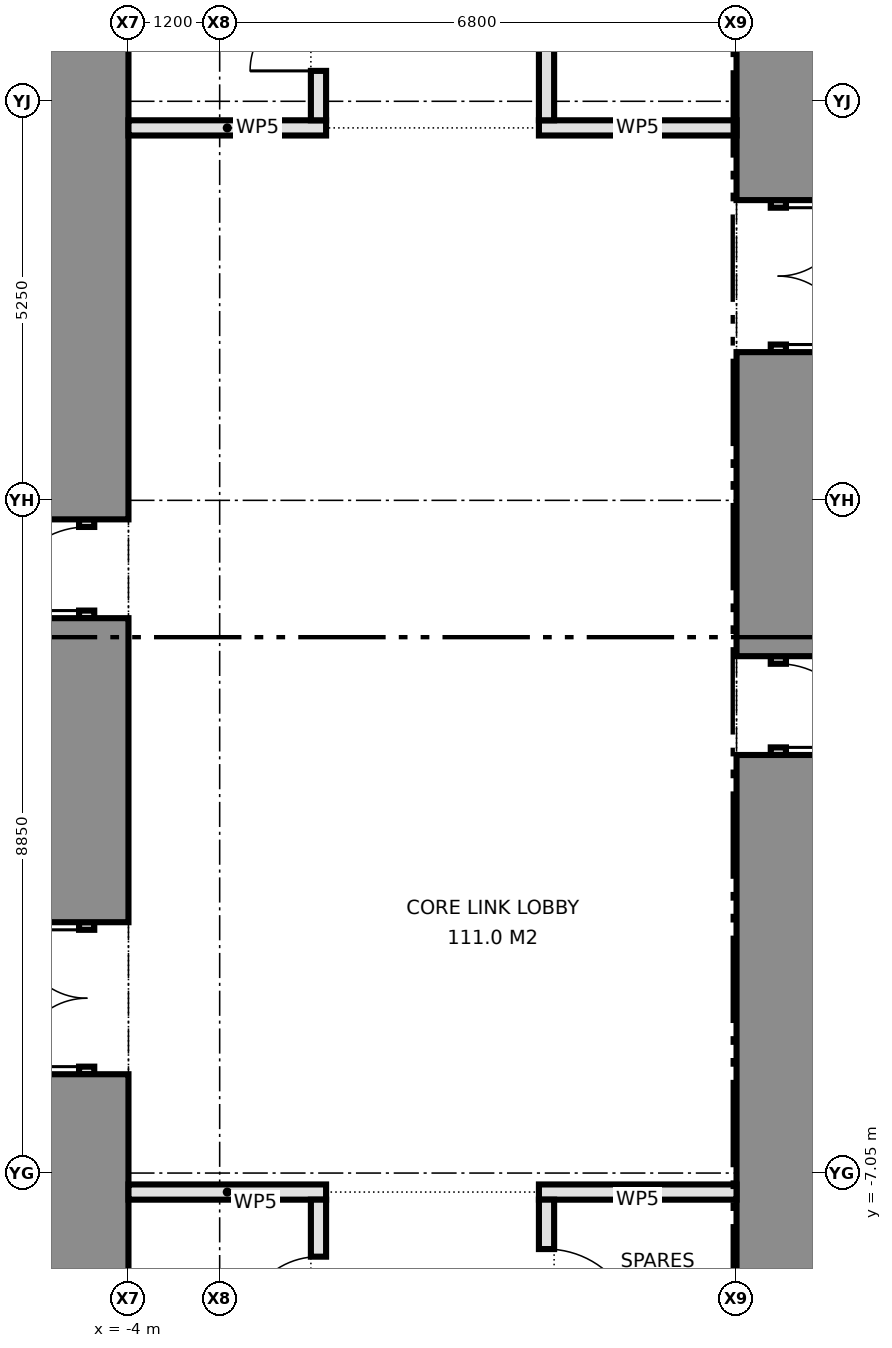
"""IFC4 building model, lengths in metres.
Left out: names, types, materials, properties, quantities, classifications, styles, units other than length and angle.
Written with IfcOpenShell. Run it as: python <this file> out.ifc"""

import sys

from ifc_helpers import new_model, si_unit, direction, frame, frame_2d, origin, place, context, subcontext, project, spatial, rectangle, extrude, element, fill, save


model = new_model("IFC4")
c1 = context("Model", 3, precision=1e-05, world=origin(), true_north=direction((0.0, 1.0)))
c2 = subcontext(c1, "Body", "Model", "MODEL_VIEW")
j1 = project(units=[si_unit("LENGTHUNIT", "METRE"), si_unit("PLANEANGLEUNIT", "RADIAN")], contexts=[c1])
p1 = place(None, origin())
s1 = spatial("IfcSite", under=j1, at=p1, CompositionType="ELEMENT")
p2 = place(p1, origin())
s2 = spatial("IfcBuilding", under=s1, at=p2, CompositionType="ELEMENT")
p3 = place(p2, frame((0.0, 0.0, 59.3)))
s3 = spatial("IfcBuildingStorey", under=s2, at=p3, CompositionType="ELEMENT", Elevation=59.3)
p4 = place(p3, frame((-4.55, -8.9, 0.0), z_axis=(0.0, 0.0, 1.0), x_axis=(0.0, 1.0, 0.0)))
e1 = element("IfcWall", 1, at=p4, inside=s3, PredefinedType="SHEAR", context=c2, shape_type="SweptSolid", body=[
    extrude(rectangle(XDim=3.15, YDim=1.1, at=frame_2d((1.575, 0.0))), origin(), (0.0, 0.0, 1.0), 4.55),
])
p5 = place(p3, frame((-4.55, -5.75, 0.0), z_axis=(0.0, 0.0, 1.0), x_axis=(0.0, 1.0, 0.0)))
e2 = element("IfcWall", 2, at=p5, inside=s3, PredefinedType="PARTITIONING", context=c2, shape_type="SweptSolid", body=[
    extrude(rectangle(XDim=2.0, YDim=0.2, at=frame_2d((1.0, 0.0))), origin(), (0.0, 0.0, 1.0), 2.4),
])
p6 = place(p5, frame((0.1, 0.0, 0.0)))
e3 = element("IfcOpeningElement", 3, at=p6, cuts=e2, PredefinedType="OPENING", context=c2, shape_type="SweptSolid", body=[
    extrude(rectangle(XDim=1.8, YDim=2.1, at=frame_2d((0.9, 1.05))), frame((0.0, 0.11, 0.0), z_axis=(0.0, -1.0, 0.0), x_axis=(1.0, 0.0, 0.0)), (0.0, 0.0, 1.0), 0.22),
])
p7 = place(p3, frame((-4.55, -3.75, 0.0), z_axis=(0.0, 0.0, 1.0), x_axis=(0.0, 1.0, 0.0)))
e4 = element("IfcWall", 4, at=p7, inside=s3, PredefinedType="SHEAR", context=c2, shape_type="SweptSolid", body=[
    extrude(rectangle(XDim=4.0, YDim=1.1, at=frame_2d((2.0, 0.0))), origin(), (0.0, 0.0, 1.0), 4.55),
])
p8 = place(p3, frame((-4.55, 0.25, 0.0), z_axis=(0.0, 0.0, 1.0), x_axis=(0.0, 1.0, 0.0)))
e5 = element("IfcWall", 5, at=p8, inside=s3, PredefinedType="PARTITIONING", context=c2, shape_type="SweptSolid", body=[
    extrude(rectangle(XDim=1.3, YDim=0.2, at=frame_2d((0.65, 0.0))), origin(), (0.0, 0.0, 1.0), 2.4),
])
p9 = place(p8, frame((0.1, 0.0, 0.0)))
e6 = element("IfcOpeningElement", 6, at=p9, cuts=e5, PredefinedType="OPENING", context=c2, shape_type="SweptSolid", body=[
    extrude(rectangle(XDim=1.1, YDim=2.1, at=frame_2d((0.55, 1.05))), frame((0.0, 0.11, 0.0), z_axis=(0.0, -1.0, 0.0), x_axis=(1.0, 0.0, 0.0)), (0.0, 0.0, 1.0), 0.22),
])
p10 = place(p3, frame((-4.55, 1.55, 0.0), z_axis=(0.0, 0.0, 1.0), x_axis=(0.0, 1.0, 0.0)))
e7 = element("IfcWall", 7, at=p10, inside=s3, PredefinedType="SHEAR", context=c2, shape_type="SweptSolid", body=[
    extrude(rectangle(XDim=7.35, YDim=1.1, at=frame_2d((3.675, 0.0))), origin(), (0.0, 0.0, 1.0), 4.55),
])
p11 = place(p3, frame((4.55, 8.9, 0.0), z_axis=(0.0, 0.0, 1.0), x_axis=(0.0, -1.0, 0.0)))
e8 = element("IfcWall", 8, at=p11, inside=s3, PredefinedType="SHEAR", context=c2, shape_type="SweptSolid", body=[
    extrude(rectangle(XDim=3.15, YDim=1.1, at=frame_2d((1.575, 0.0))), origin(), (0.0, 0.0, 1.0), 4.55),
])
p12 = place(p3, frame((4.55, 5.75, 0.0), z_axis=(0.0, 0.0, 1.0), x_axis=(0.0, -1.0, 0.0)))
e9 = element("IfcWall", 9, at=p12, inside=s3, PredefinedType="PARTITIONING", context=c2, shape_type="SweptSolid", body=[
    extrude(rectangle(XDim=2.0, YDim=0.2, at=frame_2d((1.0, 0.0))), origin(), (0.0, 0.0, 1.0), 2.4),
])
p13 = place(p12, frame((0.1, 0.0, 0.0)))
e10 = element("IfcOpeningElement", 10, at=p13, cuts=e9, PredefinedType="OPENING", context=c2, shape_type="SweptSolid", body=[
    extrude(rectangle(XDim=1.8, YDim=2.1, at=frame_2d((0.9, 1.05))), frame((0.0, 0.11, 0.0), z_axis=(0.0, -1.0, 0.0), x_axis=(1.0, 0.0, 0.0)), (0.0, 0.0, 1.0), 0.22),
])
p14 = place(p3, frame((4.55, 3.75, 0.0), z_axis=(0.0, 0.0, 1.0), x_axis=(0.0, -1.0, 0.0)))
e11 = element("IfcWall", 11, at=p14, inside=s3, PredefinedType="SHEAR", context=c2, shape_type="SweptSolid", body=[
    extrude(rectangle(XDim=4.0, YDim=1.1, at=frame_2d((2.0, 0.0))), origin(), (0.0, 0.0, 1.0), 4.55),
])
p15 = place(p3, frame((4.55, -0.25, 0.0), z_axis=(0.0, 0.0, 1.0), x_axis=(0.0, -1.0, 0.0)))
e12 = element("IfcWall", 12, at=p15, inside=s3, PredefinedType="PARTITIONING", context=c2, shape_type="SweptSolid", body=[
    extrude(rectangle(XDim=1.3, YDim=0.2, at=frame_2d((0.65, 0.0))), origin(), (0.0, 0.0, 1.0), 2.4),
])
p16 = place(p15, frame((0.1, 0.0, 0.0)))
e13 = element("IfcOpeningElement", 13, at=p16, cuts=e12, PredefinedType="OPENING", context=c2, shape_type="SweptSolid", body=[
    extrude(rectangle(XDim=1.1, YDim=2.1, at=frame_2d((0.55, 1.05))), frame((0.0, 0.11, 0.0), z_axis=(0.0, -1.0, 0.0), x_axis=(1.0, 0.0, 0.0)), (0.0, 0.0, 1.0), 0.22),
])
p17 = place(p3, frame((4.55, -1.55, 0.0), z_axis=(0.0, 0.0, 1.0), x_axis=(0.0, -1.0, 0.0)))
e14 = element("IfcWall", 14, at=p17, inside=s3, PredefinedType="SHEAR", context=c2, shape_type="SweptSolid", body=[
    extrude(rectangle(XDim=7.35, YDim=1.1, at=frame_2d((3.675, 0.0))), origin(), (0.0, 0.0, 1.0), 4.55),
])
for number, where, z_axis, x_axis in (
    (15, (-4.0, -7.3, 0.0), (0.0, 0.0, 1.0), (1.0, 0.0, 0.0)),
    (16, (1.4, -7.3, 0.0), (0.0, 0.0, 1.0), (1.0, 0.0, 0.0)),
    (17, (-4.0, 6.7, 0.0), (0.0, 0.0, 1.0), (1.0, 0.0, 0.0)),
    (18, (1.4, 6.7, 0.0), (0.0, 0.0, 1.0), (1.0, 0.0, 0.0)),
):
    element("IfcWall", number, at=place(p3, frame(where, z_axis=z_axis, x_axis=x_axis)), inside=s3, PredefinedType="PARTITIONING", context=c2, shape_type="SweptSolid", body=[
        extrude(rectangle(XDim=2.6, YDim=0.2, at=frame_2d((1.3, 0.0))), origin(), (0.0, 0.0, 1.0), 4.55),
    ])
p18 = place(p3, frame((1.5, -9.9, 0.0), z_axis=(0.0, 0.0, 1.0), x_axis=(0.0, 1.0, 0.0)))
e19 = element("IfcWall", 19, at=p18, inside=s3, PredefinedType="PARTITIONING", context=c2, shape_type="SweptSolid", body=[
    extrude(rectangle(XDim=2.5, YDim=0.2, at=frame_2d((1.25, 0.0))), origin(), (0.0, 0.0, 1.0), 4.55),
])
p19 = place(p18, frame((0.65, 0.0, 0.0)))
e20 = element("IfcOpeningElement", 20, at=p19, cuts=e19, PredefinedType="OPENING", context=c2, shape_type="SweptSolid", body=[
    extrude(rectangle(XDim=1.2, YDim=2.1, at=frame_2d((0.6, 1.05))), frame((0.0, 0.11, 0.0), z_axis=(0.0, -1.0, 0.0), x_axis=(1.0, 0.0, 0.0)), (0.0, 0.0, 1.0), 0.22),
])
p20 = place(p3, frame((1.5, 6.8, 0.0), z_axis=(0.0, 0.0, 1.0), x_axis=(0.0, 1.0, 0.0)))
e21 = element("IfcWall", 21, at=p20, inside=s3, PredefinedType="PARTITIONING", context=c2, shape_type="SweptSolid", body=[
    extrude(rectangle(XDim=3.1, YDim=0.2, at=frame_2d((1.55, 0.0))), origin(), (0.0, 0.0, 1.0), 4.55),
])
p21 = place(p20, frame((1.05, 0.0, 0.0)))
e22 = element("IfcOpeningElement", 22, at=p21, cuts=e21, PredefinedType="OPENING", context=c2, shape_type="SweptSolid", body=[
    extrude(rectangle(XDim=1.0, YDim=2.1, at=frame_2d((0.5, 1.05))), frame((0.0, 0.11, 0.0), z_axis=(0.0, -1.0, 0.0), x_axis=(1.0, 0.0, 0.0)), (0.0, 0.0, 1.0), 0.22),
])
p22 = place(p3, frame((-1.5, -9.9, 0.0), z_axis=(0.0, 0.0, 1.0), x_axis=(0.0, 1.0, 0.0)))
e23 = element("IfcWall", 23, at=p22, inside=s3, PredefinedType="PARTITIONING", context=c2, shape_type="SweptSolid", body=[
    extrude(rectangle(XDim=2.5, YDim=0.2, at=frame_2d((1.25, 0.0))), origin(), (0.0, 0.0, 1.0), 4.55),
])
p23 = place(p22, frame((0.75, 0.0, 0.0)))
e24 = element("IfcOpeningElement", 24, at=p23, cuts=e23, PredefinedType="OPENING", context=c2, shape_type="SweptSolid", body=[
    extrude(rectangle(XDim=1.0, YDim=2.1, at=frame_2d((0.5, 1.05))), frame((0.0, 0.11, 0.0), z_axis=(0.0, -1.0, 0.0), x_axis=(1.0, 0.0, 0.0)), (0.0, 0.0, 1.0), 0.22),
])
p24 = place(p3, frame((-1.5, 6.8, 0.0), z_axis=(0.0, 0.0, 1.0), x_axis=(0.0, 1.0, 0.0)))
e25 = element("IfcWall", 25, at=p24, inside=s3, PredefinedType="PARTITIONING", context=c2, shape_type="SweptSolid", body=[
    extrude(rectangle(XDim=3.1, YDim=0.2, at=frame_2d((1.55, 0.0))), origin(), (0.0, 0.0, 1.0), 4.55),
])
p25 = place(p24, frame((0.65, 0.0, 0.0)))
e26 = element("IfcOpeningElement", 26, at=p25, cuts=e25, PredefinedType="OPENING", context=c2, shape_type="SweptSolid", body=[
    extrude(rectangle(XDim=1.8, YDim=2.1, at=frame_2d((0.9, 1.05))), frame((0.0, 0.11, 0.0), z_axis=(0.0, -1.0, 0.0), x_axis=(1.0, 0.0, 0.0)), (0.0, 0.0, 1.0), 0.22),
])
p26 = place(p6, origin())
e27 = element("IfcDoor", 27, at=p26, inside=s3, OperationType="DOUBLE_DOOR_SINGLE_SWING", PredefinedType="DOOR", context=c2, shape_type="SweptSolid", body=[
    extrude(rectangle(XDim=1.8, YDim=2.1, at=frame_2d((0.9, 1.05))), frame((0.0, 0.025, 0.0), z_axis=(0.0, -1.0, 0.0), x_axis=(1.0, 0.0, 0.0)), (0.0, 0.0, 1.0), 0.05),
])
fill(e3, e27)
p27 = place(p9, origin())
e28 = element("IfcDoor", 28, at=p27, inside=s3, OperationType="SINGLE_SWING_LEFT", PredefinedType="DOOR", context=c2, shape_type="SweptSolid", body=[
    extrude(rectangle(XDim=1.1, YDim=2.1, at=frame_2d((0.55, 1.05))), frame((0.0, 0.025, 0.0), z_axis=(0.0, -1.0, 0.0), x_axis=(1.0, 0.0, 0.0)), (0.0, 0.0, 1.0), 0.05),
])
fill(e6, e28)
p28 = place(p13, origin())
e29 = element("IfcDoor", 29, at=p28, inside=s3, OperationType="DOUBLE_DOOR_SINGLE_SWING", PredefinedType="DOOR", context=c2, shape_type="SweptSolid", body=[
    extrude(rectangle(XDim=1.8, YDim=2.1, at=frame_2d((0.9, 1.05))), frame((0.0, 0.025, 0.0), z_axis=(0.0, -1.0, 0.0), x_axis=(1.0, 0.0, 0.0)), (0.0, 0.0, 1.0), 0.05),
])
fill(e10, e29)
p29 = place(p16, origin())
e30 = element("IfcDoor", 30, at=p29, inside=s3, OperationType="SINGLE_SWING_RIGHT", PredefinedType="DOOR", context=c2, shape_type="SweptSolid", body=[
    extrude(rectangle(XDim=1.1, YDim=2.1, at=frame_2d((0.55, 1.05))), frame((0.0, 0.025, 0.0), z_axis=(0.0, -1.0, 0.0), x_axis=(1.0, 0.0, 0.0)), (0.0, 0.0, 1.0), 0.05),
])
fill(e13, e30)
p30 = place(p25, origin())
e31 = element("IfcDoor", 31, at=p30, inside=s3, OperationType="DOUBLE_DOOR_SINGLE_SWING", PredefinedType="DOOR", context=c2, shape_type="SweptSolid", body=[
    extrude(rectangle(XDim=1.8, YDim=2.1, at=frame_2d((0.9, 1.05))), frame((0.0, 0.025, 0.0), z_axis=(0.0, -1.0, 0.0), x_axis=(1.0, 0.0, 0.0)), (0.0, 0.0, 1.0), 0.05),
])
fill(e26, e31)
p31 = place(p23, origin())
e32 = element("IfcDoor", 32, at=p31, inside=s3, OperationType="SINGLE_SWING_LEFT", PredefinedType="DOOR", context=c2, shape_type="SweptSolid", body=[
    extrude(rectangle(XDim=1.0, YDim=2.1, at=frame_2d((0.5, 1.05))), frame((0.0, 0.025, 0.0), z_axis=(0.0, -1.0, 0.0), x_axis=(1.0, 0.0, 0.0)), (0.0, 0.0, 1.0), 0.05),
])
fill(e24, e32)
p32 = place(p19, frame((1.2, 0.0, 0.0), z_axis=(0.0, 0.0, 1.0), x_axis=(-1.0, 0.0, 0.0)))
e33 = element("IfcDoor", 33, at=p32, inside=s3, OperationType="SINGLE_SWING_RIGHT", PredefinedType="DOOR", context=c2, shape_type="SweptSolid", body=[
    extrude(rectangle(XDim=1.2, YDim=2.1, at=frame_2d((0.6, 1.05))), frame((0.0, 0.025, 0.0), z_axis=(0.0, -1.0, 0.0), x_axis=(1.0, 0.0, 0.0)), (0.0, 0.0, 1.0), 0.05),
])
fill(e20, e33)
save(model, sys.argv[1])
